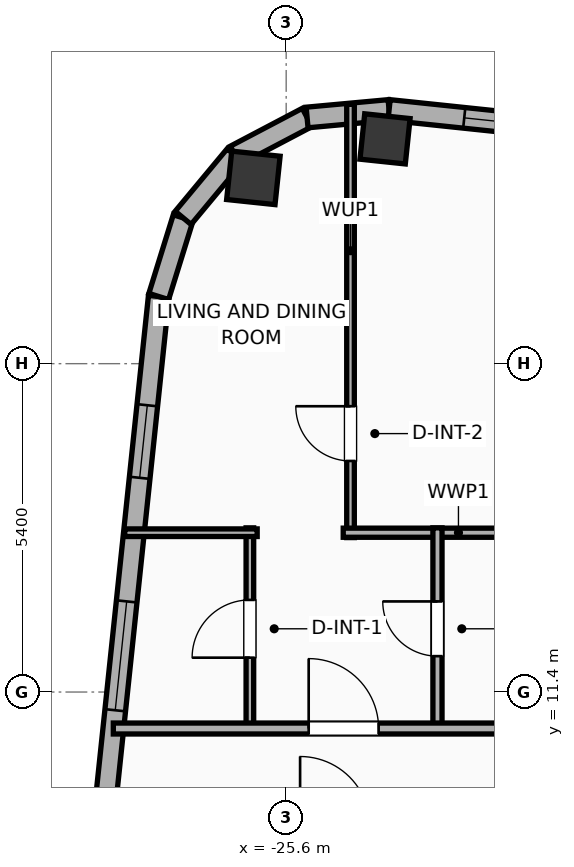
"""IFC4 building model, lengths in metres.
Left out: names, types, materials, properties, quantities, classifications, styles, units other than length and angle.
Written with IfcOpenShell. Run it as: python <this file> out.ifc"""

import sys

from ifc_helpers import new_model, si_unit, direction, frame, frame_2d, origin, origin_2d, place, context, subcontext, project, spatial, rectangle, hollow_rectangle, hollow_circle, extrude, element, fill, save


model = new_model("IFC4")
c1 = context("Model", 3, precision=1e-05, world=origin(), true_north=direction((0.0, 1.0)))
c2 = subcontext(c1, "Body", "Model", "MODEL_VIEW")
j1 = project(units=[si_unit("LENGTHUNIT", "METRE"), si_unit("PLANEANGLEUNIT", "RADIAN")], contexts=[c1])
p1 = place(None, origin())
s1 = spatial("IfcSite", under=j1, at=p1, CompositionType="ELEMENT")
p2 = place(p1, origin())
s2 = spatial("IfcBuilding", under=s1, at=p2, CompositionType="ELEMENT")
p3 = place(p2, frame((0.0, 0.0, 283.4)))
s3 = spatial("IfcBuildingStorey", under=s2, at=p3, CompositionType="ELEMENT", Elevation=283.4)
p4 = place(p3, frame((-23.975, 20.497, 0.0), z_axis=(0.0, 0.0, 1.0), x_axis=(0.994521895368, -0.104528463268, 0.0)))
e1 = element("IfcColumn", 1, at=p4, inside=s3, PredefinedType="COLUMN", context=c2, shape_type="SweptSolid", body=[
    extrude(hollow_rectangle(XDim=0.75, YDim=0.75, WallThickness=0.025, at=origin_2d()), origin(), (0.0, 0.0, 1.0), 3.9),
])
p5 = place(p3, frame((-26.139, 19.855, 0.0), z_axis=(0.0, 0.0, 1.0), x_axis=(0.994521895368, -0.104528463268, 0.0)))
e2 = element("IfcColumn", 2, at=p5, inside=s3, PredefinedType="COLUMN", context=c2, shape_type="SweptSolid", body=[
    extrude(hollow_circle(Radius=0.4, WallThickness=0.028, at=origin_2d()), origin(), (0.0, 0.0, 1.0), 3.9),
])
p6 = place(p3, frame((-30.87, -12.296, 0.0), z_axis=(0.0, 0.0, 1.0), x_axis=(0.104533282919, 0.994521388791, 0.0)))
e3 = element("IfcWall", 3, at=p6, inside=s3, PredefinedType="ELEMENTEDWALL", context=c2, shape_type="SweptSolid", body=[
    extrude(rectangle(XDim=30.366, YDim=0.34, at=frame_2d((15.183, 0.0))), origin(), (0.0, 0.0, 1.0), 3.65),
])
p7 = place(p6, frame((5.842, 0.0, 0.75)))
e4 = element("IfcOpeningElement", 4, at=p7, cuts=e3, PredefinedType="OPENING", context=c2, shape_type="SweptSolid", body=[
    extrude(rectangle(XDim=1.8, YDim=2.1, at=frame_2d((0.9, 1.05))), frame((0.0, 0.18, 0.0), z_axis=(0.0, -1.0, 0.0), x_axis=(1.0, 0.0, 0.0)), (0.0, 0.0, 1.0), 0.36),
])
p8 = place(p6, frame((23.525, 0.0, 0.75)))
e5 = element("IfcOpeningElement", 5, at=p8, cuts=e3, PredefinedType="OPENING", context=c2, shape_type="SweptSolid", body=[
    extrude(rectangle(XDim=1.8, YDim=2.1, at=frame_2d((0.9, 1.05))), frame((0.0, 0.18, 0.0), z_axis=(0.0, -1.0, 0.0), x_axis=(1.0, 0.0, 0.0)), (0.0, 0.0, 1.0), 0.36),
])
p9 = place(p6, frame((27.368, 0.0, 0.75)))
e6 = element("IfcOpeningElement", 6, at=p9, cuts=e3, PredefinedType="OPENING", context=c2, shape_type="SweptSolid", body=[
    extrude(rectangle(XDim=1.2, YDim=2.05, at=frame_2d((0.6, 1.025))), frame((0.0, 0.18, 0.0), z_axis=(0.0, -1.0, 0.0), x_axis=(1.0, 0.0, 0.0)), (0.0, 0.0, 1.0), 0.36),
])
p10 = place(p6, frame((16.487, 0.0, 0.75)))
e7 = element("IfcOpeningElement", 7, at=p10, cuts=e3, PredefinedType="OPENING", context=c2, shape_type="SweptSolid", body=[
    extrude(rectangle(XDim=1.2, YDim=2.05, at=frame_2d((0.6, 1.025))), frame((0.0, 0.18, 0.0), z_axis=(0.0, -1.0, 0.0), x_axis=(1.0, 0.0, 0.0)), (0.0, 0.0, 1.0), 0.36),
])
p11 = place(p3, frame((-27.696, 17.905, 0.0), z_axis=(0.0, 0.0, 1.0), x_axis=(0.296416228123, 0.955058856671, 0.0)))
e8 = element("IfcWall", 8, at=p11, inside=s3, PredefinedType="ELEMENTEDWALL", context=c2, shape_type="SweptSolid", body=[
    extrude(rectangle(XDim=1.354, YDim=0.34, at=frame_2d((0.677, 0.0))), origin(), (0.0, 0.0, 1.0), 3.65),
])
p12 = place(p3, frame((-27.294, 19.198, 0.0), z_axis=(0.0, 0.0, 1.0), x_axis=(0.639501603217, 0.768789762863, 0.0)))
e9 = element("IfcWall", 9, at=p12, inside=s3, PredefinedType="ELEMENTEDWALL", context=c2, shape_type="SweptSolid", body=[
    extrude(rectangle(XDim=1.337, YDim=0.34, at=frame_2d((0.668, 0.0))), origin(), (0.0, 0.0, 1.0), 3.65),
])
p13 = place(p3, frame((-26.439, 20.226, 0.0), z_axis=(0.0, 0.0, 1.0), x_axis=(0.884922182678, 0.465738908193, 0.0)))
e10 = element("IfcWall", 10, at=p13, inside=s3, PredefinedType="ELEMENTEDWALL", context=c2, shape_type="SweptSolid", body=[
    extrude(rectangle(XDim=1.337, YDim=0.34, at=frame_2d((0.668, 0.0))), origin(), (0.0, 0.0, 1.0), 3.65),
])
p14 = place(p3, frame((-25.256, 20.848, 0.0), z_axis=(0.0, 0.0, 1.0), x_axis=(0.995813013343, 0.091413579172, 0.0)))
e11 = element("IfcWall", 11, at=p14, inside=s3, PredefinedType="ELEMENTEDWALL", context=c2, shape_type="SweptSolid", body=[
    extrude(rectangle(XDim=1.354, YDim=0.34, at=frame_2d((0.677, 0.0))), origin(), (0.0, 0.0, 1.0), 3.65),
])
p15 = place(p3, frame((-23.908, 20.972, 0.0), z_axis=(0.0, 0.0, 1.0), x_axis=(0.994521888554, -0.104528528102, 0.0)))
e12 = element("IfcWall", 12, at=p15, inside=s3, PredefinedType="ELEMENTEDWALL", context=c2, shape_type="SweptSolid", body=[
    extrude(rectangle(XDim=46.766, YDim=0.34, at=frame_2d((23.383, 0.0))), origin(), (0.0, 0.0, 1.0), 3.65),
])
p16 = place(p15, frame((23.833, 0.0, 0.75)))
e13 = element("IfcOpeningElement", 13, at=p16, cuts=e12, PredefinedType="OPENING", context=c2, shape_type="SweptSolid", body=[
    extrude(rectangle(XDim=2.4, YDim=2.1, at=frame_2d((1.2, 1.05))), frame((0.0, 0.18, 0.0), z_axis=(0.0, -1.0, 0.0), x_axis=(1.0, 0.0, 0.0)), (0.0, 0.0, 1.0), 0.36),
])
p17 = place(p15, frame((1.243, 0.0, 0.75)))
e14 = element("IfcOpeningElement", 14, at=p17, cuts=e12, PredefinedType="OPENING", context=c2, shape_type="SweptSolid", body=[
    extrude(rectangle(XDim=1.2, YDim=2.05, at=frame_2d((0.6, 1.025))), frame((0.0, 0.18, 0.0), z_axis=(0.0, -1.0, 0.0), x_axis=(1.0, 0.0, 0.0)), (0.0, 0.0, 1.0), 0.36),
])
p18 = place(p15, frame((4.157, 0.0, 0.75)))
e15 = element("IfcOpeningElement", 15, at=p18, cuts=e12, PredefinedType="OPENING", context=c2, shape_type="SweptSolid", body=[
    extrude(rectangle(XDim=1.2, YDim=2.05, at=frame_2d((0.6, 1.025))), frame((0.0, 0.18, 0.0), z_axis=(0.0, -1.0, 0.0), x_axis=(1.0, 0.0, 0.0)), (0.0, 0.0, 1.0), 0.36),
])
p19 = place(p15, frame((7.475, 0.0, 0.75)))
e16 = element("IfcOpeningElement", 16, at=p19, cuts=e12, PredefinedType="OPENING", context=c2, shape_type="SweptSolid", body=[
    extrude(rectangle(XDim=1.2, YDim=2.05, at=frame_2d((0.6, 1.025))), frame((0.0, 0.18, 0.0), z_axis=(0.0, -1.0, 0.0), x_axis=(1.0, 0.0, 0.0)), (0.0, 0.0, 1.0), 0.36),
])
p20 = place(p15, frame((11.513, 0.0, 0.75)))
e17 = element("IfcOpeningElement", 17, at=p20, cuts=e12, PredefinedType="OPENING", context=c2, shape_type="SweptSolid", body=[
    extrude(rectangle(XDim=1.2, YDim=2.05, at=frame_2d((0.6, 1.025))), frame((0.0, 0.18, 0.0), z_axis=(0.0, -1.0, 0.0), x_axis=(1.0, 0.0, 0.0)), (0.0, 0.0, 1.0), 0.36),
])
p21 = place(p15, frame((15.192, 0.0, 0.75)))
e18 = element("IfcOpeningElement", 18, at=p21, cuts=e12, PredefinedType="OPENING", context=c2, shape_type="SweptSolid", body=[
    extrude(rectangle(XDim=1.2, YDim=2.05, at=frame_2d((0.6, 1.025))), frame((0.0, 0.18, 0.0), z_axis=(0.0, -1.0, 0.0), x_axis=(1.0, 0.0, 0.0)), (0.0, 0.0, 1.0), 0.36),
])
p22 = place(p15, frame((19.671, 0.0, 0.75)))
e19 = element("IfcOpeningElement", 19, at=p22, cuts=e12, PredefinedType="OPENING", context=c2, shape_type="SweptSolid", body=[
    extrude(rectangle(XDim=1.2, YDim=2.05, at=frame_2d((0.6, 1.025))), frame((0.0, 0.18, 0.0), z_axis=(0.0, -1.0, 0.0), x_axis=(1.0, 0.0, 0.0)), (0.0, 0.0, 1.0), 0.36),
])
p23 = place(p15, frame((29.801, 0.0, 0.75)))
e20 = element("IfcOpeningElement", 20, at=p23, cuts=e12, PredefinedType="OPENING", context=c2, shape_type="SweptSolid", body=[
    extrude(rectangle(XDim=1.2, YDim=2.05, at=frame_2d((0.6, 1.025))), frame((0.0, 0.18, 0.0), z_axis=(0.0, -1.0, 0.0), x_axis=(1.0, 0.0, 0.0)), (0.0, 0.0, 1.0), 0.36),
])
p24 = place(p15, frame((33.35, 0.0, 0.75)))
e21 = element("IfcOpeningElement", 21, at=p24, cuts=e12, PredefinedType="OPENING", context=c2, shape_type="SweptSolid", body=[
    extrude(rectangle(XDim=1.2, YDim=2.05, at=frame_2d((0.6, 1.025))), frame((0.0, 0.18, 0.0), z_axis=(0.0, -1.0, 0.0), x_axis=(1.0, 0.0, 0.0)), (0.0, 0.0, 1.0), 0.36),
])
p25 = place(p15, frame((38.034, 0.0, 0.75)))
e22 = element("IfcOpeningElement", 22, at=p25, cuts=e12, PredefinedType="OPENING", context=c2, shape_type="SweptSolid", body=[
    extrude(rectangle(XDim=0.85, YDim=2.05, at=frame_2d((0.425, 1.025))), frame((0.0, 0.18, 0.0), z_axis=(0.0, -1.0, 0.0), x_axis=(1.0, 0.0, 0.0)), (0.0, 0.0, 1.0), 0.36),
])
p26 = place(p15, frame((40.448, 0.0, 0.75)))
e23 = element("IfcOpeningElement", 23, at=p26, cuts=e12, PredefinedType="OPENING", context=c2, shape_type="SweptSolid", body=[
    extrude(rectangle(XDim=1.2, YDim=2.05, at=frame_2d((0.6, 1.025))), frame((0.0, 0.18, 0.0), z_axis=(0.0, -1.0, 0.0), x_axis=(1.0, 0.0, 0.0)), (0.0, 0.0, 1.0), 0.36),
])
p27 = place(p15, frame((43.718, 0.0, 0.75)))
e24 = element("IfcOpeningElement", 24, at=p27, cuts=e12, PredefinedType="OPENING", context=c2, shape_type="SweptSolid", body=[
    extrude(rectangle(XDim=1.2, YDim=2.05, at=frame_2d((0.6, 1.025))), frame((0.0, 0.18, 0.0), z_axis=(0.0, -1.0, 0.0), x_axis=(1.0, 0.0, 0.0)), (0.0, 0.0, 1.0), 0.36),
])
p28 = place(p3, frame((-24.542, 13.94, 0.0), z_axis=(0.0, 0.0, 1.0), x_axis=(0.0, 1.0, 0.0)))
e25 = element("IfcWall", 25, at=p28, inside=s3, PredefinedType="PARTITIONING", context=c2, shape_type="SweptSolid", body=[
    extrude(rectangle(XDim=7.125, YDim=0.125, at=frame_2d((3.562, 0.0))), origin(), (0.0, 0.0, 1.0), 3.65),
])
p29 = place(p28, frame((1.26, 0.0, 0.0)))
e26 = element("IfcOpeningElement", 26, at=p29, cuts=e25, PredefinedType="OPENING", context=c2, shape_type="SweptSolid", body=[
    extrude(rectangle(XDim=0.9, YDim=2.05, at=frame_2d((0.45, 1.025))), frame((0.0, 0.073, 0.0), z_axis=(0.0, -1.0, 0.0), x_axis=(1.0, 0.0, 0.0)), (0.0, 0.0, 1.0), 0.145),
])
p30 = place(p3, frame((-24.662, 14.02, 0.0), z_axis=(0.0, 0.0, 1.0), x_axis=(1.0, 0.0, 0.0)))
e27 = element("IfcWall", 27, at=p30, inside=s3, PredefinedType="PLUMBINGWALL", context=c2, shape_type="SweptSolid", body=[
    extrude(rectangle(XDim=3.79, YDim=0.15, at=frame_2d((1.895, 0.0))), origin(), (0.0, 0.0, 1.0), 3.65),
])
p31 = place(p3, frame((-26.197, 10.78, 0.0), z_axis=(0.0, 0.0, 1.0), x_axis=(0.0, 1.0, 0.0)))
e28 = element("IfcWall", 28, at=p31, inside=s3, PredefinedType="PARTITIONING", context=c2, shape_type="SweptSolid", body=[
    extrude(rectangle(XDim=3.32, YDim=0.125, at=frame_2d((1.66, 0.0))), origin(), (0.0, 0.0, 1.0), 3.65),
])
p32 = place(p31, frame((1.185, 0.0, 0.0)))
e29 = element("IfcOpeningElement", 29, at=p32, cuts=e28, PredefinedType="OPENING", context=c2, shape_type="SweptSolid", body=[
    extrude(rectangle(XDim=0.95, YDim=2.05, at=frame_2d((0.475, 1.025))), frame((0.0, 0.073, 0.0), z_axis=(0.0, -1.0, 0.0), x_axis=(1.0, 0.0, 0.0)), (0.0, 0.0, 1.0), 0.145),
])
p33 = place(p3, frame((-28.255, 14.02, 0.0), z_axis=(0.0, 0.0, 1.0), x_axis=(1.0, 0.0, 0.0)))
e30 = element("IfcWall", 30, at=p33, inside=s3, PredefinedType="PARTITIONING", context=c2, shape_type="SweptSolid", body=[
    extrude(rectangle(XDim=2.178, YDim=0.125, at=frame_2d((1.089, 0.0))), origin(), (0.0, 0.0, 1.0), 3.65),
])
p34 = place(p3, frame((-23.112, 10.78, 0.0), z_axis=(0.0, 0.0, 1.0), x_axis=(0.0, 1.0, 0.0)))
e31 = element("IfcWall", 31, at=p34, inside=s3, PredefinedType="PLUMBINGWALL", context=c2, shape_type="SweptSolid", body=[
    extrude(rectangle(XDim=3.32, YDim=0.15, at=frame_2d((1.66, 0.0))), origin(), (0.0, 0.0, 1.0), 3.65),
])
p35 = place(p34, frame((1.21, 0.0, 0.0)))
e32 = element("IfcOpeningElement", 32, at=p35, cuts=e31, PredefinedType="OPENING", context=c2, shape_type="SweptSolid", body=[
    extrude(rectangle(XDim=0.9, YDim=2.05, at=frame_2d((0.45, 1.025))), frame((0.0, 0.085, 0.0), z_axis=(0.0, -1.0, 0.0), x_axis=(1.0, 0.0, 0.0)), (0.0, 0.0, 1.0), 0.17),
])
p36 = place(p3, frame((-28.443, 10.8, 0.0), z_axis=(0.0, 0.0, 1.0), x_axis=(1.0, 0.0, 0.0)))
e33 = element("IfcWall", 33, at=p36, inside=s3, PredefinedType="PARTITIONING", context=c2, shape_type="SweptSolid", body=[
    extrude(rectangle(XDim=53.956, YDim=0.18, at=frame_2d((26.978, 0.0))), origin(), (0.0, 0.0, 1.0), 3.65),
])
p37 = place(p36, frame((3.213, 0.0, 0.0)))
e34 = element("IfcOpeningElement", 34, at=p37, cuts=e33, PredefinedType="OPENING", context=c2, shape_type="SweptSolid", body=[
    extrude(rectangle(XDim=1.15, YDim=2.05, at=frame_2d((0.575, 1.025))), frame((0.0, 0.1, 0.0), z_axis=(0.0, -1.0, 0.0), x_axis=(1.0, 0.0, 0.0)), (0.0, 0.0, 1.0), 0.2),
])
p38 = place(p36, frame((10.556, 0.0, 0.0)))
e35 = element("IfcOpeningElement", 35, at=p38, cuts=e33, PredefinedType="OPENING", context=c2, shape_type="SweptSolid", body=[
    extrude(rectangle(XDim=1.15, YDim=2.05, at=frame_2d((0.575, 1.025))), frame((0.0, 0.1, 0.0), z_axis=(0.0, -1.0, 0.0), x_axis=(1.0, 0.0, 0.0)), (0.0, 0.0, 1.0), 0.2),
])
p39 = place(p36, frame((17.872, 0.0, 0.0)))
e36 = element("IfcOpeningElement", 36, at=p39, cuts=e33, PredefinedType="OPENING", context=c2, shape_type="SweptSolid", body=[
    extrude(rectangle(XDim=1.15, YDim=2.05, at=frame_2d((0.575, 1.025))), frame((0.0, 0.1, 0.0), z_axis=(0.0, -1.0, 0.0), x_axis=(1.0, 0.0, 0.0)), (0.0, 0.0, 1.0), 0.2),
])
p40 = place(p36, frame((24.45, 0.0, 0.0)))
e37 = element("IfcOpeningElement", 37, at=p40, cuts=e33, PredefinedType="OPENING", context=c2, shape_type="SweptSolid", body=[
    extrude(rectangle(XDim=0.9, YDim=2.05, at=frame_2d((0.45, 1.025))), frame((0.0, 0.1, 0.0), z_axis=(0.0, -1.0, 0.0), x_axis=(1.0, 0.0, 0.0)), (0.0, 0.0, 1.0), 0.2),
])
p41 = place(p36, frame((29.954, 0.0, 0.0)))
e38 = element("IfcOpeningElement", 38, at=p41, cuts=e33, PredefinedType="OPENING", context=c2, shape_type="SweptSolid", body=[
    extrude(rectangle(XDim=0.9, YDim=2.05, at=frame_2d((0.45, 1.025))), frame((0.0, 0.1, 0.0), z_axis=(0.0, -1.0, 0.0), x_axis=(1.0, 0.0, 0.0)), (0.0, 0.0, 1.0), 0.2),
])
p42 = place(p36, frame((36.186, 0.0, 0.0)))
e39 = element("IfcOpeningElement", 39, at=p42, cuts=e33, PredefinedType="OPENING", context=c2, shape_type="SweptSolid", body=[
    extrude(rectangle(XDim=0.9, YDim=2.05, at=frame_2d((0.45, 1.025))), frame((0.0, 0.1, 0.0), z_axis=(0.0, -1.0, 0.0), x_axis=(1.0, 0.0, 0.0)), (0.0, 0.0, 1.0), 0.2),
])
p43 = place(p36, frame((43.249, 0.0, 0.0)))
e40 = element("IfcOpeningElement", 40, at=p43, cuts=e33, PredefinedType="OPENING", context=c2, shape_type="SweptSolid", body=[
    extrude(rectangle(XDim=0.9, YDim=2.05, at=frame_2d((0.45, 1.025))), frame((0.0, 0.1, 0.0), z_axis=(0.0, -1.0, 0.0), x_axis=(1.0, 0.0, 0.0)), (0.0, 0.0, 1.0), 0.2),
])
p44 = place(p36, frame((50.311, 0.0, 0.0)))
e41 = element("IfcOpeningElement", 41, at=p44, cuts=e33, PredefinedType="OPENING", context=c2, shape_type="SweptSolid", body=[
    extrude(rectangle(XDim=0.9, YDim=2.05, at=frame_2d((0.45, 1.025))), frame((0.0, 0.1, 0.0), z_axis=(0.0, -1.0, 0.0), x_axis=(1.0, 0.0, 0.0)), (0.0, 0.0, 1.0), 0.2),
])
p45 = place(p8, origin())
e42 = element("IfcWindow", 42, at=p45, inside=s3, PartitioningType="SINGLE_PANEL", PredefinedType="WINDOW", context=c2, shape_type="SweptSolid", body=[
    extrude(rectangle(XDim=1.8, YDim=2.1, at=frame_2d((0.9, 1.05))), frame((0.0, 0.03, 0.0), z_axis=(0.0, -1.0, 0.0), x_axis=(1.0, 0.0, 0.0)), (0.0, 0.0, 1.0), 0.06),
])
fill(e5, e42)
p46 = place(p9, origin())
e43 = element("IfcWindow", 43, at=p46, inside=s3, PartitioningType="SINGLE_PANEL", PredefinedType="WINDOW", context=c2, shape_type="SweptSolid", body=[
    extrude(rectangle(XDim=1.2, YDim=2.05, at=frame_2d((0.6, 1.025))), frame((0.0, 0.03, 0.0), z_axis=(0.0, -1.0, 0.0), x_axis=(1.0, 0.0, 0.0)), (0.0, 0.0, 1.0), 0.06),
])
fill(e6, e43)
p47 = place(p17, origin())
e44 = element("IfcWindow", 44, at=p47, inside=s3, PartitioningType="SINGLE_PANEL", PredefinedType="WINDOW", context=c2, shape_type="SweptSolid", body=[
    extrude(rectangle(XDim=1.2, YDim=2.05, at=frame_2d((0.6, 1.025))), frame((0.0, 0.03, 0.0), z_axis=(0.0, -1.0, 0.0), x_axis=(1.0, 0.0, 0.0)), (0.0, 0.0, 1.0), 0.06),
])
fill(e14, e44)
p48 = place(p29, origin())
e45 = element("IfcDoor", 45, at=p48, inside=s3, OperationType="SINGLE_SWING_RIGHT", PredefinedType="DOOR", context=c2, shape_type="SweptSolid", body=[
    extrude(rectangle(XDim=0.9, YDim=2.05, at=frame_2d((0.45, 1.025))), frame((0.0, 0.025, 0.0), z_axis=(0.0, -1.0, 0.0), x_axis=(1.0, 0.0, 0.0)), (0.0, 0.0, 1.0), 0.05),
])
fill(e26, e45)
p49 = place(p32, origin())
e46 = element("IfcDoor", 46, at=p49, inside=s3, OperationType="SINGLE_SWING_LEFT", PredefinedType="DOOR", context=c2, shape_type="SweptSolid", body=[
    extrude(rectangle(XDim=0.95, YDim=2.05, at=frame_2d((0.475, 1.025))), frame((0.0, 0.025, 0.0), z_axis=(0.0, -1.0, 0.0), x_axis=(1.0, 0.0, 0.0)), (0.0, 0.0, 1.0), 0.05),
])
fill(e29, e46)
p50 = place(p35, origin())
e47 = element("IfcDoor", 47, at=p50, inside=s3, OperationType="SINGLE_SWING_RIGHT", PredefinedType="DOOR", context=c2, shape_type="SweptSolid", body=[
    extrude(rectangle(XDim=0.9, YDim=2.05, at=frame_2d((0.45, 1.025))), frame((0.0, 0.025, 0.0), z_axis=(0.0, -1.0, 0.0), x_axis=(1.0, 0.0, 0.0)), (0.0, 0.0, 1.0), 0.05),
])
fill(e32, e47)
p51 = place(p37, origin())
e48 = element("IfcDoor", 48, at=p51, inside=s3, OperationType="SINGLE_SWING_LEFT", PredefinedType="DOOR", context=c2, shape_type="SweptSolid", body=[
    extrude(rectangle(XDim=1.15, YDim=2.05, at=frame_2d((0.575, 1.025))), frame((0.0, 0.025, 0.0), z_axis=(0.0, -1.0, 0.0), x_axis=(1.0, 0.0, 0.0)), (0.0, 0.0, 1.0), 0.05),
])
fill(e34, e48)
save(model, sys.argv[1])
